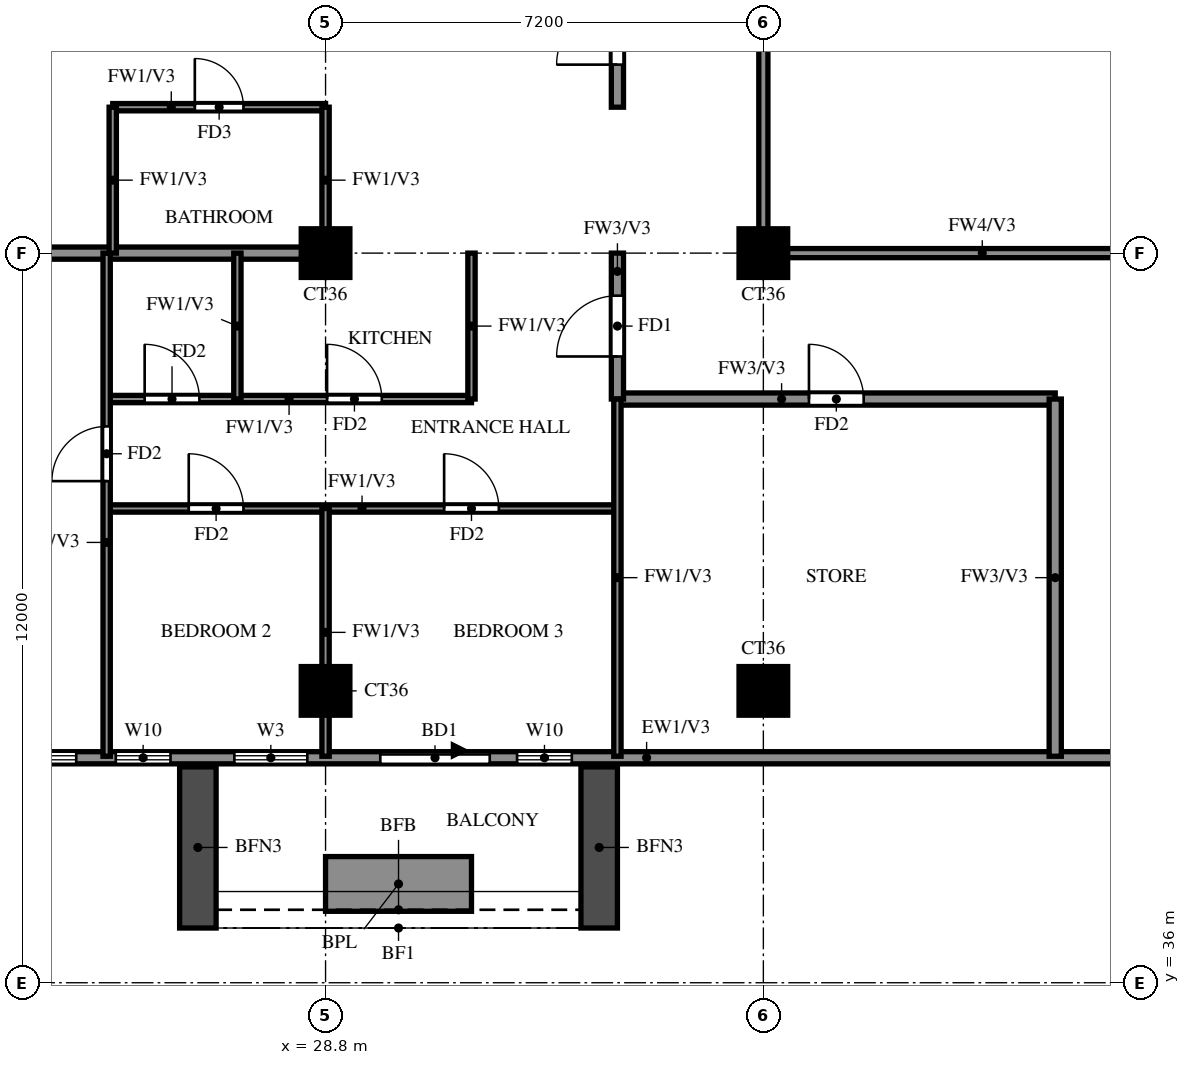
"""IFC4 building model, lengths in metres.
Left out: names, types, materials, properties, quantities, classifications, styles, units other than length and angle.
Written with IfcOpenShell. Run it as: python <this file> out.ifc"""

import sys

from ifc_helpers import new_model, si_unit, direction, frame, frame_2d, origin, origin_2d, place, context, subcontext, project, spatial, rectangle, extrude, source, transform, mapped, element, fill, save


model = new_model("IFC4")
c1 = context("Model", 3, precision=1e-05, world=origin(), true_north=direction((0.0, 1.0)))
c2 = subcontext(c1, "Body", "Model", "MODEL_VIEW")
j1 = project(units=[si_unit("LENGTHUNIT", "METRE"), si_unit("PLANEANGLEUNIT", "RADIAN")], contexts=[c1])
p1 = place(None, origin())
s1 = spatial("IfcSite", under=j1, at=p1, CompositionType="ELEMENT")
p2 = place(p1, origin())
s2 = spatial("IfcBuilding", under=s1, at=p2, CompositionType="ELEMENT")
p3 = place(p2, frame((0.0, 0.0, 239.5)))
s3 = spatial("IfcBuildingStorey", under=s2, at=p3, CompositionType="ELEMENT", Elevation=239.5)
m1 = source(origin(), c2, "Body", "SweptSolid", [
    extrude(rectangle(XDim=0.8, YDim=0.8, at=origin_2d()), origin(), (0.0, 0.0, 1.0), 3.22),
])
for number, where, z_axis, x_axis in (
    (1, (28.8, 40.8, 0.0), (0.0, 0.0, 1.0), (1.0, 0.0, 0.0)),
    (2, (36.0, 40.8, 0.0), (0.0, 0.0, 1.0), (1.0, 0.0, 0.0)),
    (3, (28.8, 48.0, 0.0), (0.0, 0.0, 1.0), (1.0, 0.0, 0.0)),
    (4, (36.0, 48.0, 0.0), (0.0, 0.0, 1.0), (1.0, 0.0, 0.0)),
):
    element("IfcColumn", number, at=place(p3, frame(where, z_axis=z_axis, x_axis=x_axis)), inside=s3, PredefinedType="COLUMN", context=c2, shape_type="MappedRepresentation", body=[
        mapped(m1, transform((0.0, 0.0, 0.0))),
    ])
p4 = place(p3, frame((22.2, 39.7, 0.0), z_axis=(0.0, 0.0, 1.0), x_axis=(1.0, 0.0, 0.0)))
e5 = element("IfcWall", 5, at=p4, inside=s3, PredefinedType="SOLIDWALL", context=c2, shape_type="SweptSolid", body=[
    extrude(rectangle(XDim=19.8, YDim=0.2, at=frame_2d((9.9, 0.0))), origin(), (0.0, 0.0, 1.0), 3.22),
])
p5 = place(p4, frame((7.5, 0.0, 0.0)))
e6 = element("IfcOpeningElement", 6, at=p5, cuts=e5, PredefinedType="OPENING", context=c2, shape_type="SweptSolid", body=[
    extrude(rectangle(XDim=1.8, YDim=2.4, at=frame_2d((0.9, 1.2))), frame((0.0, 0.11, 0.0), z_axis=(0.0, -1.0, 0.0), x_axis=(1.0, 0.0, 0.0)), (0.0, 0.0, 1.0), 0.22),
])
p6 = place(p4, frame((0.7, 0.0, 0.6)))
e7 = element("IfcOpeningElement", 7, at=p6, cuts=e5, PredefinedType="OPENING", context=c2, shape_type="SweptSolid", body=[
    extrude(rectangle(XDim=1.8, YDim=2.4, at=frame_2d((0.9, 1.2))), frame((0.0, 0.11, 0.0), z_axis=(0.0, -1.0, 0.0), x_axis=(1.0, 0.0, 0.0)), (0.0, 0.0, 1.0), 0.22),
])
p7 = place(p4, frame((3.15, 0.0, 0.6)))
e8 = element("IfcOpeningElement", 8, at=p7, cuts=e5, PredefinedType="OPENING", context=c2, shape_type="SweptSolid", body=[
    extrude(rectangle(XDim=0.9, YDim=2.4, at=frame_2d((0.45, 1.2))), frame((0.0, 0.11, 0.0), z_axis=(0.0, -1.0, 0.0), x_axis=(1.0, 0.0, 0.0)), (0.0, 0.0, 1.0), 0.22),
])
p8 = place(p4, frame((5.1, 0.0, 0.6)))
e9 = element("IfcOpeningElement", 9, at=p8, cuts=e5, PredefinedType="OPENING", context=c2, shape_type="SweptSolid", body=[
    extrude(rectangle(XDim=1.2, YDim=2.4, at=frame_2d((0.6, 1.2))), frame((0.0, 0.11, 0.0), z_axis=(0.0, -1.0, 0.0), x_axis=(1.0, 0.0, 0.0)), (0.0, 0.0, 1.0), 0.22),
])
p9 = place(p4, frame((9.75, 0.0, 0.6)))
e10 = element("IfcOpeningElement", 10, at=p9, cuts=e5, PredefinedType="OPENING", context=c2, shape_type="SweptSolid", body=[
    extrude(rectangle(XDim=0.9, YDim=2.4, at=frame_2d((0.45, 1.2))), frame((0.0, 0.11, 0.0), z_axis=(0.0, -1.0, 0.0), x_axis=(1.0, 0.0, 0.0)), (0.0, 0.0, 1.0), 0.22),
])
for number, where, z_axis, x_axis in (
    (11, (26.7, 39.55, 0.0), (0.0, 0.0, 1.0), (0.0, -1.0, 0.0)),
    (12, (33.3, 39.55, 0.0), (0.0, 0.0, 1.0), (0.0, -1.0, 0.0)),
):
    element("IfcWall", number, at=place(p3, frame(where, z_axis=z_axis, x_axis=x_axis)), inside=s3, PredefinedType="SOLIDWALL", context=c2, shape_type="SweptSolid", body=[
        extrude(rectangle(XDim=2.65, YDim=0.6, at=frame_2d((1.325, 0.0))), origin(), (0.0, 0.0, 1.0), 2.85),
    ])
p10 = place(p3, frame((28.8, 37.625, 0.0), z_axis=(0.0, 0.0, 1.0), x_axis=(1.0, 0.0, 0.0)))
e13 = element("IfcWall", 13, at=p10, inside=s3, PredefinedType="SOLIDWALL", context=c2, shape_type="SweptSolid", body=[
    extrude(rectangle(XDim=2.4, YDim=0.9, at=frame_2d((1.2, 0.0))), origin(), (0.0, 0.0, 1.0), 0.9),
])
p11 = place(p3, frame((33.6, 45.6, 0.0), z_axis=(0.0, 0.0, 1.0), x_axis=(1.0, 0.0, 0.0)))
e14 = element("IfcWall", 14, at=p11, inside=s3, PredefinedType="SOLIDWALL", context=c2, shape_type="SweptSolid", body=[
    extrude(rectangle(XDim=7.2, YDim=0.2, at=frame_2d((3.6, 0.0))), origin(), (0.0, 0.0, 1.0), 3.22),
])
p12 = place(p11, frame((3.15, 0.0, 0.0)))
e15 = element("IfcOpeningElement", 15, at=p12, cuts=e14, PredefinedType="OPENING", context=c2, shape_type="SweptSolid", body=[
    extrude(rectangle(XDim=0.9, YDim=2.1, at=frame_2d((0.45, 1.05))), frame((0.0, 0.11, 0.0), z_axis=(0.0, -1.0, 0.0), x_axis=(1.0, 0.0, 0.0)), (0.0, 0.0, 1.0), 0.22),
])
p13 = place(p3, frame((33.6, 45.6, 0.0), z_axis=(0.0, 0.0, 1.0), x_axis=(0.0, 1.0, 0.0)))
e16 = element("IfcWall", 16, at=p13, inside=s3, PredefinedType="SOLIDWALL", context=c2, shape_type="SweptSolid", body=[
    extrude(rectangle(XDim=2.4, YDim=0.2, at=frame_2d((1.2, 0.0))), origin(), (0.0, 0.0, 1.0), 3.22),
])
p14 = place(p13, frame((0.7, 0.0, 0.0)))
e17 = element("IfcOpeningElement", 17, at=p14, cuts=e16, PredefinedType="OPENING", context=c2, shape_type="SweptSolid", body=[
    extrude(rectangle(XDim=1.0, YDim=2.1, at=frame_2d((0.5, 1.05))), frame((0.0, 0.11, 0.0), z_axis=(0.0, -1.0, 0.0), x_axis=(1.0, 0.0, 0.0)), (0.0, 0.0, 1.0), 0.22),
])
p15 = place(p3, frame((33.6, 50.4, 0.0), z_axis=(0.0, 0.0, 1.0), x_axis=(0.0, 1.0, 0.0)))
e18 = element("IfcWall", 18, at=p15, inside=s3, PredefinedType="SOLIDWALL", context=c2, shape_type="SweptSolid", body=[
    extrude(rectangle(XDim=12.0, YDim=0.2, at=frame_2d((6.0, 0.0))), origin(), (0.0, 0.0, 1.0), 3.22),
])
p16 = place(p15, frame((0.7, 0.0, 0.0)))
e19 = element("IfcOpeningElement", 19, at=p16, cuts=e18, PredefinedType="OPENING", context=c2, shape_type="SweptSolid", body=[
    extrude(rectangle(XDim=1.0, YDim=2.1, at=frame_2d((0.5, 1.05))), frame((0.0, 0.11, 0.0), z_axis=(0.0, -1.0, 0.0), x_axis=(1.0, 0.0, 0.0)), (0.0, 0.0, 1.0), 0.22),
])
p17 = place(p15, frame((9.7, 0.0, 0.0)))
e20 = element("IfcOpeningElement", 20, at=p17, cuts=e18, PredefinedType="OPENING", context=c2, shape_type="SweptSolid", body=[
    extrude(rectangle(XDim=1.0, YDim=2.1, at=frame_2d((0.5, 1.05))), frame((0.0, 0.11, 0.0), z_axis=(0.0, -1.0, 0.0), x_axis=(1.0, 0.0, 0.0)), (0.0, 0.0, 1.0), 0.22),
])
p18 = place(p3, frame((40.8, 39.725, 0.0), z_axis=(0.0, 0.0, 1.0), x_axis=(0.0, 1.0, 0.0)))
e21 = element("IfcWall", 21, at=p18, inside=s3, PredefinedType="SOLIDWALL", context=c2, shape_type="SweptSolid", body=[
    extrude(rectangle(XDim=5.875, YDim=0.2, at=frame_2d((2.938, 0.0))), origin(), (0.0, 0.0, 1.0), 3.22),
])
p19 = place(p3, frame((18.525, 48.0, 0.0), z_axis=(0.0, 0.0, 1.0), x_axis=(1.0, 0.0, 0.0)))
e22 = element("IfcWall", 22, at=p19, inside=s3, PredefinedType="SOLIDWALL", context=c2, shape_type="SweptSolid", body=[
    extrude(rectangle(XDim=10.275, YDim=0.2, at=frame_2d((5.138, 0.0))), origin(), (0.0, 0.0, 1.0), 3.22),
])
p20 = place(p3, frame((25.2, 43.8, 0.0), z_axis=(0.0, 0.0, 1.0), x_axis=(1.0, 0.0, 0.0)))
e23 = element("IfcWall", 23, at=p20, inside=s3, PredefinedType="PARTITIONING", context=c2, shape_type="SweptSolid", body=[
    extrude(rectangle(XDim=8.4, YDim=0.12, at=frame_2d((4.2, 0.0))), origin(), (0.0, 0.0, 1.0), 3.22),
])
p21 = place(p20, frame((1.35, 0.0, 0.0)))
e24 = element("IfcOpeningElement", 24, at=p21, cuts=e23, PredefinedType="OPENING", context=c2, shape_type="SweptSolid", body=[
    extrude(rectangle(XDim=0.9, YDim=2.1, at=frame_2d((0.45, 1.05))), frame((0.0, 0.07, 0.0), z_axis=(0.0, -1.0, 0.0), x_axis=(1.0, 0.0, 0.0)), (0.0, 0.0, 1.0), 0.14),
])
p22 = place(p20, frame((5.55, 0.0, 0.0)))
e25 = element("IfcOpeningElement", 25, at=p22, cuts=e23, PredefinedType="OPENING", context=c2, shape_type="SweptSolid", body=[
    extrude(rectangle(XDim=0.9, YDim=2.1, at=frame_2d((0.45, 1.05))), frame((0.0, 0.07, 0.0), z_axis=(0.0, -1.0, 0.0), x_axis=(1.0, 0.0, 0.0)), (0.0, 0.0, 1.0), 0.14),
])
p23 = place(p3, frame((25.2, 45.6, 0.0), z_axis=(0.0, 0.0, 1.0), x_axis=(1.0, 0.0, 0.0)))
e26 = element("IfcWall", 26, at=p23, inside=s3, PredefinedType="PARTITIONING", context=c2, shape_type="SweptSolid", body=[
    extrude(rectangle(XDim=6.0, YDim=0.12, at=frame_2d((3.0, 0.0))), origin(), (0.0, 0.0, 1.0), 3.22),
])
p24 = place(p23, frame((0.625, 0.0, 0.0)))
e27 = element("IfcOpeningElement", 27, at=p24, cuts=e26, PredefinedType="OPENING", context=c2, shape_type="SweptSolid", body=[
    extrude(rectangle(XDim=0.9, YDim=2.1, at=frame_2d((0.45, 1.05))), frame((0.0, 0.07, 0.0), z_axis=(0.0, -1.0, 0.0), x_axis=(1.0, 0.0, 0.0)), (0.0, 0.0, 1.0), 0.14),
])
p25 = place(p23, frame((3.625, 0.0, 0.0)))
e28 = element("IfcOpeningElement", 28, at=p25, cuts=e26, PredefinedType="OPENING", context=c2, shape_type="SweptSolid", body=[
    extrude(rectangle(XDim=0.9, YDim=2.1, at=frame_2d((0.45, 1.05))), frame((0.0, 0.07, 0.0), z_axis=(0.0, -1.0, 0.0), x_axis=(1.0, 0.0, 0.0)), (0.0, 0.0, 1.0), 0.14),
])
p26 = place(p3, frame((25.3, 50.4, 0.0), z_axis=(0.0, 0.0, 1.0), x_axis=(1.0, 0.0, 0.0)))
e29 = element("IfcWall", 29, at=p26, inside=s3, PredefinedType="PARTITIONING", context=c2, shape_type="SweptSolid", body=[
    extrude(rectangle(XDim=3.5, YDim=0.12, at=frame_2d((1.75, 0.0))), origin(), (0.0, 0.0, 1.0), 3.22),
])
p27 = place(p26, frame((1.35, 0.0, 0.0)))
e30 = element("IfcOpeningElement", 30, at=p27, cuts=e29, PredefinedType="OPENING", context=c2, shape_type="SweptSolid", body=[
    extrude(rectangle(XDim=0.8, YDim=2.1, at=frame_2d((0.4, 1.05))), frame((0.0, 0.07, 0.0), z_axis=(0.0, -1.0, 0.0), x_axis=(1.0, 0.0, 0.0)), (0.0, 0.0, 1.0), 0.14),
])
p28 = place(p3, frame((25.2, 39.725, 0.0), z_axis=(0.0, 0.0, 1.0), x_axis=(0.0, 1.0, 0.0)))
e31 = element("IfcWall", 31, at=p28, inside=s3, PredefinedType="PARTITIONING", context=c2, shape_type="SweptSolid", body=[
    extrude(rectangle(XDim=8.275, YDim=0.12, at=frame_2d((4.137, 0.0))), origin(), (0.0, 0.0, 1.0), 3.22),
])
p29 = place(p28, frame((4.525, 0.0, 0.0)))
e32 = element("IfcOpeningElement", 32, at=p29, cuts=e31, PredefinedType="OPENING", context=c2, shape_type="SweptSolid", body=[
    extrude(rectangle(XDim=0.9, YDim=2.1, at=frame_2d((0.45, 1.05))), frame((0.0, 0.07, 0.0), z_axis=(0.0, -1.0, 0.0), x_axis=(1.0, 0.0, 0.0)), (0.0, 0.0, 1.0), 0.14),
])
for number, where, z_axis, x_axis in (
    (33, (25.3, 48.0, 0.0), (0.0, 0.0, 1.0), (0.0, 1.0, 0.0)),
    (34, (27.35, 45.6, 0.0), (0.0, 0.0, 1.0), (0.0, 1.0, 0.0)),
):
    element("IfcWall", number, at=place(p3, frame(where, z_axis=z_axis, x_axis=x_axis)), inside=s3, PredefinedType="PARTITIONING", context=c2, shape_type="SweptSolid", body=[
        extrude(rectangle(XDim=2.4, YDim=0.12, at=frame_2d((1.2, 0.0))), origin(), (0.0, 0.0, 1.0), 3.22),
    ])
p30 = place(p3, frame((28.8, 39.725, 0.0), z_axis=(0.0, 0.0, 1.0), x_axis=(0.0, 1.0, 0.0)))
e35 = element("IfcWall", 35, at=p30, inside=s3, PredefinedType="PARTITIONING", context=c2, shape_type="SweptSolid", body=[
    extrude(rectangle(XDim=4.075, YDim=0.12, at=frame_2d((2.038, 0.0))), origin(), (0.0, 0.0, 1.0), 3.22),
])
for number, where, z_axis, x_axis in (
    (36, (28.8, 48.0, 0.0), (0.0, 0.0, 1.0), (0.0, 1.0, 0.0)),
    (37, (31.2, 45.6, 0.0), (0.0, 0.0, 1.0), (0.0, 1.0, 0.0)),
):
    element("IfcWall", number, at=place(p3, frame(where, z_axis=z_axis, x_axis=x_axis)), inside=s3, PredefinedType="PARTITIONING", context=c2, shape_type="SweptSolid", body=[
        extrude(rectangle(XDim=2.4, YDim=0.12, at=frame_2d((1.2, 0.0))), origin(), (0.0, 0.0, 1.0), 3.22),
    ])
p31 = place(p3, frame((33.6, 39.725, 0.0), z_axis=(0.0, 0.0, 1.0), x_axis=(0.0, 1.0, 0.0)))
e38 = element("IfcWall", 38, at=p31, inside=s3, PredefinedType="PARTITIONING", context=c2, shape_type="SweptSolid", body=[
    extrude(rectangle(XDim=5.875, YDim=0.12, at=frame_2d((2.938, 0.0))), origin(), (0.0, 0.0, 1.0), 3.22),
])
p32 = place(p3, frame((36.0, 48.0, 0.0), z_axis=(0.0, 0.0, 1.0), x_axis=(1.0, 0.0, 0.0)))
e39 = element("IfcWall", 39, at=p32, inside=s3, PredefinedType="SOLIDWALL", context=c2, shape_type="SweptSolid", body=[
    extrude(rectangle(XDim=7.2, YDim=0.15, at=frame_2d((3.6, 0.0))), origin(), (0.0, 0.0, 1.0), 2.32),
])
p33 = place(p3, frame((36.0, 48.0, 0.0), z_axis=(0.0, 0.0, 1.0), x_axis=(0.0, 1.0, 0.0)))
e40 = element("IfcWall", 40, at=p33, inside=s3, PredefinedType="SOLIDWALL", context=c2, shape_type="SweptSolid", body=[
    extrude(rectangle(XDim=14.4, YDim=0.15, at=frame_2d((7.2, 0.0))), origin(), (0.0, 0.0, 1.0), 2.32),
])
p34 = place(p5, origin())
e41 = element("IfcDoor", 41, at=p34, inside=s3, OperationType="DOUBLE_DOOR_SLIDING", PredefinedType="DOOR", context=c2, shape_type="SweptSolid", body=[
    extrude(rectangle(XDim=1.8, YDim=2.4, at=frame_2d((0.9, 1.2))), frame((0.0, 0.025, 0.0), z_axis=(0.0, -1.0, 0.0), x_axis=(1.0, 0.0, 0.0)), (0.0, 0.0, 1.0), 0.05),
])
fill(e6, e41)
p35 = place(p6, origin())
e42 = element("IfcWindow", 42, at=p35, inside=s3, PartitioningType="DOUBLE_PANEL_VERTICAL", PredefinedType="WINDOW", context=c2, shape_type="SweptSolid", body=[
    extrude(rectangle(XDim=1.8, YDim=2.4, at=frame_2d((0.9, 1.2))), frame((0.0, 0.03, 0.0), z_axis=(0.0, -1.0, 0.0), x_axis=(1.0, 0.0, 0.0)), (0.0, 0.0, 1.0), 0.06),
])
fill(e7, e42)
p36 = place(p7, origin())
e43 = element("IfcWindow", 43, at=p36, inside=s3, PartitioningType="SINGLE_PANEL", PredefinedType="WINDOW", context=c2, shape_type="SweptSolid", body=[
    extrude(rectangle(XDim=0.9, YDim=2.4, at=frame_2d((0.45, 1.2))), frame((0.0, 0.03, 0.0), z_axis=(0.0, -1.0, 0.0), x_axis=(1.0, 0.0, 0.0)), (0.0, 0.0, 1.0), 0.06),
])
fill(e8, e43)
p37 = place(p8, origin())
e44 = element("IfcWindow", 44, at=p37, inside=s3, PartitioningType="SINGLE_PANEL", PredefinedType="WINDOW", context=c2, shape_type="SweptSolid", body=[
    extrude(rectangle(XDim=1.2, YDim=2.4, at=frame_2d((0.6, 1.2))), frame((0.0, 0.03, 0.0), z_axis=(0.0, -1.0, 0.0), x_axis=(1.0, 0.0, 0.0)), (0.0, 0.0, 1.0), 0.06),
])
fill(e9, e44)
p38 = place(p9, origin())
e45 = element("IfcWindow", 45, at=p38, inside=s3, PartitioningType="SINGLE_PANEL", PredefinedType="WINDOW", context=c2, shape_type="SweptSolid", body=[
    extrude(rectangle(XDim=0.9, YDim=2.4, at=frame_2d((0.45, 1.2))), frame((0.0, 0.03, 0.0), z_axis=(0.0, -1.0, 0.0), x_axis=(1.0, 0.0, 0.0)), (0.0, 0.0, 1.0), 0.06),
])
fill(e10, e45)
p39 = place(p14, origin())
e46 = element("IfcDoor", 46, at=p39, inside=s3, OperationType="SINGLE_SWING_LEFT", PredefinedType="DOOR", context=c2, shape_type="SweptSolid", body=[
    extrude(rectangle(XDim=1.0, YDim=2.1, at=frame_2d((0.5, 1.05))), frame((0.0, 0.025, 0.0), z_axis=(0.0, -1.0, 0.0), x_axis=(1.0, 0.0, 0.0)), (0.0, 0.0, 1.0), 0.05),
])
fill(e17, e46)
p40 = place(p29, origin())
e47 = element("IfcDoor", 47, at=p40, inside=s3, OperationType="SINGLE_SWING_LEFT", PredefinedType="DOOR", context=c2, shape_type="SweptSolid", body=[
    extrude(rectangle(XDim=0.9, YDim=2.1, at=frame_2d((0.45, 1.05))), frame((0.0, 0.025, 0.0), z_axis=(0.0, -1.0, 0.0), x_axis=(1.0, 0.0, 0.0)), (0.0, 0.0, 1.0), 0.05),
])
fill(e32, e47)
p41 = place(p21, origin())
e48 = element("IfcDoor", 48, at=p41, inside=s3, OperationType="SINGLE_SWING_RIGHT", PredefinedType="DOOR", context=c2, shape_type="SweptSolid", body=[
    extrude(rectangle(XDim=0.9, YDim=2.1, at=frame_2d((0.45, 1.05))), frame((0.0, 0.025, 0.0), z_axis=(0.0, -1.0, 0.0), x_axis=(1.0, 0.0, 0.0)), (0.0, 0.0, 1.0), 0.05),
])
fill(e24, e48)
p42 = place(p22, origin())
e49 = element("IfcDoor", 49, at=p42, inside=s3, OperationType="SINGLE_SWING_LEFT", PredefinedType="DOOR", context=c2, shape_type="SweptSolid", body=[
    extrude(rectangle(XDim=0.9, YDim=2.1, at=frame_2d((0.45, 1.05))), frame((0.0, 0.025, 0.0), z_axis=(0.0, -1.0, 0.0), x_axis=(1.0, 0.0, 0.0)), (0.0, 0.0, 1.0), 0.05),
])
fill(e25, e49)
p43 = place(p24, origin())
e50 = element("IfcDoor", 50, at=p43, inside=s3, OperationType="SINGLE_SWING_LEFT", PredefinedType="DOOR", context=c2, shape_type="SweptSolid", body=[
    extrude(rectangle(XDim=0.9, YDim=2.1, at=frame_2d((0.45, 1.05))), frame((0.0, 0.025, 0.0), z_axis=(0.0, -1.0, 0.0), x_axis=(1.0, 0.0, 0.0)), (0.0, 0.0, 1.0), 0.05),
])
fill(e27, e50)
p44 = place(p25, origin())
e51 = element("IfcDoor", 51, at=p44, inside=s3, OperationType="SINGLE_SWING_RIGHT", PredefinedType="DOOR", context=c2, shape_type="SweptSolid", body=[
    extrude(rectangle(XDim=0.9, YDim=2.1, at=frame_2d((0.45, 1.05))), frame((0.0, 0.025, 0.0), z_axis=(0.0, -1.0, 0.0), x_axis=(1.0, 0.0, 0.0)), (0.0, 0.0, 1.0), 0.05),
])
fill(e28, e51)
p45 = place(p12, origin())
e52 = element("IfcDoor", 52, at=p45, inside=s3, OperationType="SINGLE_SWING_LEFT", PredefinedType="DOOR", context=c2, shape_type="SweptSolid", body=[
    extrude(rectangle(XDim=0.9, YDim=2.1, at=frame_2d((0.45, 1.05))), frame((0.0, 0.025, 0.0), z_axis=(0.0, -1.0, 0.0), x_axis=(1.0, 0.0, 0.0)), (0.0, 0.0, 1.0), 0.05),
])
fill(e15, e52)
p46 = place(p16, origin())
e53 = element("IfcDoor", 53, at=p46, inside=s3, OperationType="SINGLE_SWING_LEFT", PredefinedType="DOOR", context=c2, shape_type="SweptSolid", body=[
    extrude(rectangle(XDim=1.0, YDim=2.1, at=frame_2d((0.5, 1.05))), frame((0.0, 0.025, 0.0), z_axis=(0.0, -1.0, 0.0), x_axis=(1.0, 0.0, 0.0)), (0.0, 0.0, 1.0), 0.05),
])
fill(e19, e53)
p47 = place(p27, origin())
e54 = element("IfcDoor", 54, at=p47, inside=s3, OperationType="SINGLE_SWING_LEFT", PredefinedType="DOOR", context=c2, shape_type="SweptSolid", body=[
    extrude(rectangle(XDim=0.8, YDim=2.1, at=frame_2d((0.4, 1.05))), frame((0.0, 0.025, 0.0), z_axis=(0.0, -1.0, 0.0), x_axis=(1.0, 0.0, 0.0)), (0.0, 0.0, 1.0), 0.05),
])
fill(e30, e54)
save(model, sys.argv[1])
